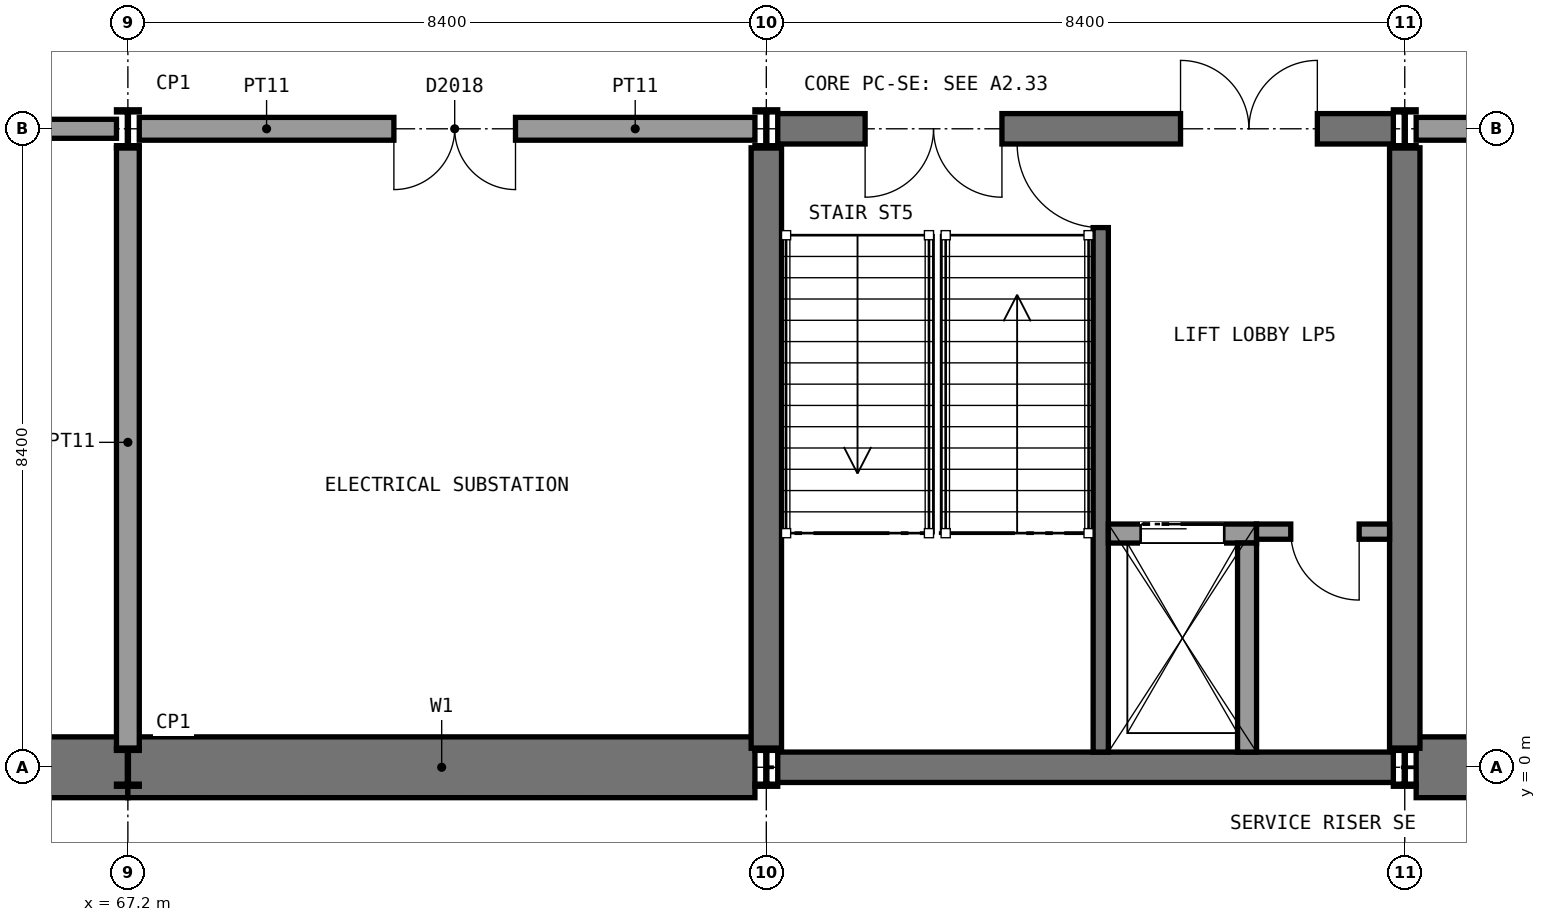
"""IFC4 building model, lengths in metres.
Left out: names, types, materials, properties, quantities, classifications, styles, units other than length and angle.
Written with IfcOpenShell. Run it as: python <this file> out.ifc"""

import sys

from ifc_helpers import new_model, si_unit, direction, frame, frame_2d, origin, origin_2d, place, context, subcontext, project, spatial, rectangle, i_section, extrude, element, fill, save


model = new_model("IFC4")
c1 = context("Model", 3, precision=1e-05, world=origin(), true_north=direction((0.0, 1.0)))
c2 = subcontext(c1, "Body", "Model", "MODEL_VIEW")
j1 = project(units=[si_unit("LENGTHUNIT", "METRE"), si_unit("PLANEANGLEUNIT", "RADIAN")], contexts=[c1])
p1 = place(None, origin())
s1 = spatial("IfcSite", under=j1, at=p1, CompositionType="ELEMENT")
p2 = place(p1, origin())
s2 = spatial("IfcBuilding", under=s1, at=p2, CompositionType="ELEMENT")
p3 = place(p2, frame((0.0, 0.0, -9.9)))
s3 = spatial("IfcBuildingStorey", under=s2, at=p3, CompositionType="ELEMENT", Elevation=-9.9)
p4 = place(p3, frame((58.95, 0.0, 0.0), z_axis=(0.0, 0.0, 1.0), x_axis=(1.0, 0.0, 0.0)))
e1 = element("IfcWall", 1, at=p4, inside=s3, PredefinedType="SOLIDWALL", context=c2, shape_type="SweptSolid", body=[
    extrude(rectangle(XDim=8.25, YDim=0.8, at=frame_2d((4.125, 0.0))), origin(), (0.0, 0.0, 1.0), 4.65),
])
p5 = place(p3, frame((67.2, 0.0, 0.0), z_axis=(0.0, 0.0, 1.0), x_axis=(1.0, 0.0, 0.0)))
e2 = element("IfcWall", 2, at=p5, inside=s3, PredefinedType="SOLIDWALL", context=c2, shape_type="SweptSolid", body=[
    extrude(rectangle(XDim=8.25, YDim=0.8, at=frame_2d((4.125, 0.0))), origin(), (0.0, 0.0, 1.0), 4.65),
])
p6 = place(p3, frame((84.15, 0.0, 0.0), z_axis=(0.0, 0.0, 1.0), x_axis=(1.0, 0.0, 0.0)))
e3 = element("IfcWall", 3, at=p6, inside=s3, PredefinedType="SOLIDWALL", context=c2, shape_type="SweptSolid", body=[
    extrude(rectangle(XDim=8.25, YDim=0.8, at=frame_2d((4.125, 0.0))), origin(), (0.0, 0.0, 1.0), 4.65),
])
p7 = place(p3, frame((75.75, 0.0, 0.0), z_axis=(0.0, 0.0, 1.0), x_axis=(1.0, 0.0, 0.0)))
e4 = element("IfcWall", 4, at=p7, inside=s3, PredefinedType="SHEAR", context=c2, shape_type="SweptSolid", body=[
    extrude(rectangle(XDim=8.1, YDim=0.4, at=frame_2d((4.05, 0.0))), origin(), (0.0, 0.0, 1.0), 4.65),
])
p8 = place(p3, frame((75.75, 8.4, 0.0), z_axis=(0.0, 0.0, 1.0), x_axis=(1.0, 0.0, 0.0)))
e5 = element("IfcWall", 5, at=p8, inside=s3, PredefinedType="SHEAR", context=c2, shape_type="SweptSolid", body=[
    extrude(rectangle(XDim=8.1, YDim=0.4, at=frame_2d((4.05, 0.0))), origin(), (0.0, 0.0, 1.0), 4.65),
])
p9 = place(p8, frame((1.15, 0.0, 0.0)))
e6 = element("IfcOpeningElement", 6, at=p9, cuts=e5, PredefinedType="OPENING", context=c2, shape_type="SweptSolid", body=[
    extrude(rectangle(XDim=1.8, YDim=2.1, at=frame_2d((0.9, 1.05))), frame((0.0, 0.21, 0.0), z_axis=(0.0, -1.0, 0.0), x_axis=(1.0, 0.0, 0.0)), (0.0, 0.0, 1.0), 0.42),
])
p10 = place(p8, frame((5.3, 0.0, 0.0)))
e7 = element("IfcOpeningElement", 7, at=p10, cuts=e5, PredefinedType="OPENING", context=c2, shape_type="SweptSolid", body=[
    extrude(rectangle(XDim=1.8, YDim=2.1, at=frame_2d((0.9, 1.05))), frame((0.0, 0.21, 0.0), z_axis=(0.0, -1.0, 0.0), x_axis=(1.0, 0.0, 0.0)), (0.0, 0.0, 1.0), 0.42),
])
for number, where, z_axis, x_axis in (
    (8, (75.6, 0.25, 0.0), (0.0, 0.0, 1.0), (0.0, 1.0, 0.0)),
    (9, (84.0, 0.25, 0.0), (0.0, 0.0, 1.0), (0.0, 1.0, 0.0)),
):
    element("IfcWall", number, at=place(p3, frame(where, z_axis=z_axis, x_axis=x_axis)), inside=s3, PredefinedType="SHEAR", context=c2, shape_type="SweptSolid", body=[
        extrude(rectangle(XDim=7.9, YDim=0.4, at=frame_2d((3.95, 0.0))), origin(), (0.0, 0.0, 1.0), 4.65),
    ])
for number, where, z_axis, x_axis in (
    (10, (67.2, 0.0, 0.0), (0.0, 0.0, 1.0), (1.0, 0.0, 0.0)),
    (11, (67.2, 8.4, 0.0), (0.0, 0.0, 1.0), (1.0, 0.0, 0.0)),
    (12, (75.6, 0.0, 0.0), (0.0, 0.0, 1.0), (1.0, 0.0, 0.0)),
    (13, (75.6, 8.4, 0.0), (0.0, 0.0, 1.0), (1.0, 0.0, 0.0)),
    (14, (84.0, 0.0, 0.0), (0.0, 0.0, 1.0), (1.0, 0.0, 0.0)),
    (15, (84.0, 8.4, 0.0), (0.0, 0.0, 1.0), (1.0, 0.0, 0.0)),
):
    element("IfcColumn", number, at=place(p3, frame(where, z_axis=z_axis, x_axis=x_axis)), inside=s3, PredefinedType="COLUMN", context=c2, shape_type="SweptSolid", body=[
        extrude(i_section(OverallWidth=0.3, OverallDepth=0.5, WebThickness=0.014, FlangeThickness=0.028, FilletRadius=0.027, at=origin_2d()), origin(), (0.0, 0.0, 1.0), 5.0),
    ])
p11 = place(p3, frame((58.95, 8.4, 0.0), z_axis=(0.0, 0.0, 1.0), x_axis=(1.0, 0.0, 0.0)))
e16 = element("IfcWall", 16, at=p11, inside=s3, PredefinedType="SOLIDWALL", context=c2, shape_type="SweptSolid", body=[
    extrude(rectangle(XDim=8.1, YDim=0.25, at=frame_2d((4.05, 0.0))), origin(), (0.0, 0.0, 1.0), 4.65),
])
p12 = place(p11, frame((3.35, 0.0, 0.0)))
e17 = element("IfcOpeningElement", 17, at=p12, cuts=e16, PredefinedType="OPENING", context=c2, shape_type="SweptSolid", body=[
    extrude(rectangle(XDim=1.6, YDim=2.2, at=frame_2d((0.8, 1.1))), frame((0.0, 0.135, 0.0), z_axis=(0.0, -1.0, 0.0), x_axis=(1.0, 0.0, 0.0)), (0.0, 0.0, 1.0), 0.27),
])
p13 = place(p3, frame((67.35, 8.4, 0.0), z_axis=(0.0, 0.0, 1.0), x_axis=(1.0, 0.0, 0.0)))
e18 = element("IfcWall", 18, at=p13, inside=s3, PredefinedType="SOLIDWALL", context=c2, shape_type="SweptSolid", body=[
    extrude(rectangle(XDim=8.1, YDim=0.3, at=frame_2d((4.05, 0.0))), origin(), (0.0, 0.0, 1.0), 4.65),
])
p14 = place(p13, frame((3.35, 0.0, 0.0)))
e19 = element("IfcOpeningElement", 19, at=p14, cuts=e18, PredefinedType="OPENING", context=c2, shape_type="SweptSolid", body=[
    extrude(rectangle(XDim=1.6, YDim=2.2, at=frame_2d((0.8, 1.1))), frame((0.0, 0.16, 0.0), z_axis=(0.0, -1.0, 0.0), x_axis=(1.0, 0.0, 0.0)), (0.0, 0.0, 1.0), 0.32),
])
p15 = place(p3, frame((84.15, 8.4, 0.0), z_axis=(0.0, 0.0, 1.0), x_axis=(1.0, 0.0, 0.0)))
e20 = element("IfcWall", 20, at=p15, inside=s3, PredefinedType="SOLIDWALL", context=c2, shape_type="SweptSolid", body=[
    extrude(rectangle(XDim=8.1, YDim=0.3, at=frame_2d((4.05, 0.0))), origin(), (0.0, 0.0, 1.0), 4.65),
])
p16 = place(p15, frame((3.35, 0.0, 0.0)))
e21 = element("IfcOpeningElement", 21, at=p16, cuts=e20, PredefinedType="OPENING", context=c2, shape_type="SweptSolid", body=[
    extrude(rectangle(XDim=1.6, YDim=2.2, at=frame_2d((0.8, 1.1))), frame((0.0, 0.16, 0.0), z_axis=(0.0, -1.0, 0.0), x_axis=(1.0, 0.0, 0.0)), (0.0, 0.0, 1.0), 0.32),
])
p17 = place(p3, frame((67.2, 0.25, 0.0), z_axis=(0.0, 0.0, 1.0), x_axis=(0.0, 1.0, 0.0)))
e22 = element("IfcWall", 22, at=p17, inside=s3, PredefinedType="SOLIDWALL", context=c2, shape_type="SweptSolid", body=[
    extrude(rectangle(XDim=7.9, YDim=0.3, at=frame_2d((3.95, 0.0))), origin(), (0.0, 0.0, 1.0), 4.65),
])
p18 = place(p3, frame((80.0, 0.2, 0.0), z_axis=(0.0, 0.0, 1.0), x_axis=(0.0, 1.0, 0.0)))
e23 = element("IfcWall", 23, at=p18, inside=s3, PredefinedType="SHEAR", context=c2, shape_type="SweptSolid", body=[
    extrude(rectangle(XDim=8.0, YDim=0.2, at=frame_2d((4.0, 0.0))), origin(), (0.0, 0.0, 1.0), 4.65),
])
p19 = place(p18, frame((6.9, 0.0, 0.0)))
e24 = element("IfcOpeningElement", 24, at=p19, cuts=e23, PredefinedType="OPENING", context=c2, shape_type="SweptSolid", body=[
    extrude(rectangle(XDim=1.11, YDim=2.1, at=frame_2d((0.555, 1.05))), frame((0.0, 0.11, 0.0), z_axis=(0.0, -1.0, 0.0), x_axis=(1.0, 0.0, 0.0)), (0.0, 0.0, 1.0), 0.22),
])
p20 = place(p3, frame((80.1, 3.075, -1.4), z_axis=(0.0, 0.0, 1.0), x_axis=(1.0, 0.0, 0.0)))
e25 = element("IfcWall", 25, at=p20, inside=s3, PredefinedType="SOLIDWALL", context=c2, shape_type="SweptSolid", body=[
    extrude(rectangle(XDim=1.95, YDim=0.25, at=frame_2d((0.975, 0.0))), origin(), (0.0, 0.0, 1.0), 6.4),
])
p21 = place(p20, frame((0.425, 0.0, 1.4)))
e26 = element("IfcOpeningElement", 26, at=p21, cuts=e25, PredefinedType="OPENING", context=c2, shape_type="SweptSolid", body=[
    extrude(rectangle(XDim=1.1, YDim=2.1, at=frame_2d((0.55, 1.05))), frame((0.0, 0.135, 0.0), z_axis=(0.0, -1.0, 0.0), x_axis=(1.0, 0.0, 0.0)), (0.0, 0.0, 1.0), 0.27),
])
p22 = place(p3, frame((81.925, 0.2, -1.4), z_axis=(0.0, 0.0, 1.0), x_axis=(0.0, 1.0, 0.0)))
e27 = element("IfcWall", 27, at=p22, inside=s3, PredefinedType="SOLIDWALL", context=c2, shape_type="SweptSolid", body=[
    extrude(rectangle(XDim=2.75, YDim=0.25, at=frame_2d((1.375, 0.0))), origin(), (0.0, 0.0, 1.0), 6.4),
])
p23 = place(p3, frame((82.05, 3.1, 0.0), z_axis=(0.0, 0.0, 1.0), x_axis=(1.0, 0.0, 0.0)))
e28 = element("IfcWall", 28, at=p23, inside=s3, PredefinedType="PARTITIONING", context=c2, shape_type="SweptSolid", body=[
    extrude(rectangle(XDim=1.75, YDim=0.2, at=frame_2d((0.875, 0.0))), origin(), (0.0, 0.0, 1.0), 4.65),
])
p24 = place(p23, frame((0.45, 0.0, 0.0)))
e29 = element("IfcOpeningElement", 29, at=p24, cuts=e28, PredefinedType="OPENING", context=c2, shape_type="SweptSolid", body=[
    extrude(rectangle(XDim=0.9, YDim=2.1, at=frame_2d((0.45, 1.05))), frame((0.0, 0.11, 0.0), z_axis=(0.0, -1.0, 0.0), x_axis=(1.0, 0.0, 0.0)), (0.0, 0.0, 1.0), 0.22),
])
p25 = place(p14, frame((1.6, 0.0, 0.0), z_axis=(0.0, 0.0, 1.0), x_axis=(-1.0, 0.0, 0.0)))
e30 = element("IfcDoor", 30, at=p25, inside=s3, OperationType="DOUBLE_DOOR_SINGLE_SWING", PredefinedType="DOOR", context=c2, shape_type="SweptSolid", body=[
    extrude(rectangle(XDim=1.6, YDim=2.2, at=frame_2d((0.8, 1.1))), frame((0.0, 0.025, 0.0), z_axis=(0.0, -1.0, 0.0), x_axis=(1.0, 0.0, 0.0)), (0.0, 0.0, 1.0), 0.05),
])
fill(e19, e30)
p26 = place(p19, origin())
e31 = element("IfcDoor", 31, at=p26, inside=s3, OperationType="SINGLE_SWING_RIGHT", PredefinedType="DOOR", context=c2, shape_type="SweptSolid", body=[
    extrude(rectangle(XDim=1.1, YDim=2.1, at=frame_2d((0.55, 1.05))), frame((0.0, 0.025, 0.0), z_axis=(0.0, -1.0, 0.0), x_axis=(1.0, 0.0, 0.0)), (0.0, 0.0, 1.0), 0.05),
])
fill(e24, e31)
p27 = place(p21, origin())
e32 = element("IfcDoor", 32, at=p27, inside=s3, OperationType="SLIDING_TO_LEFT", PredefinedType="DOOR", context=c2, shape_type="SweptSolid", body=[
    extrude(rectangle(XDim=1.1, YDim=2.1, at=frame_2d((0.55, 1.05))), frame((0.0, 0.025, 0.0), z_axis=(0.0, -1.0, 0.0), x_axis=(1.0, 0.0, 0.0)), (0.0, 0.0, 1.0), 0.05),
])
fill(e26, e32)
p28 = place(p24, frame((0.9, 0.0, 0.0), z_axis=(0.0, 0.0, 1.0), x_axis=(-1.0, 0.0, 0.0)))
e33 = element("IfcDoor", 33, at=p28, inside=s3, OperationType="SINGLE_SWING_LEFT", PredefinedType="DOOR", context=c2, shape_type="SweptSolid", body=[
    extrude(rectangle(XDim=0.9, YDim=2.1, at=frame_2d((0.45, 1.05))), frame((0.0, 0.025, 0.0), z_axis=(0.0, -1.0, 0.0), x_axis=(1.0, 0.0, 0.0)), (0.0, 0.0, 1.0), 0.05),
])
fill(e29, e33)
p29 = place(p9, frame((1.8, 0.0, 0.0), z_axis=(0.0, 0.0, 1.0), x_axis=(-1.0, 0.0, 0.0)))
e34 = element("IfcDoor", 34, at=p29, inside=s3, OperationType="DOUBLE_DOOR_SINGLE_SWING", PredefinedType="DOOR", context=c2, shape_type="SweptSolid", body=[
    extrude(rectangle(XDim=1.8, YDim=2.1, at=frame_2d((0.9, 1.05))), frame((0.0, 0.025, 0.0), z_axis=(0.0, -1.0, 0.0), x_axis=(1.0, 0.0, 0.0)), (0.0, 0.0, 1.0), 0.05),
])
fill(e6, e34)
p30 = place(p10, origin())
e35 = element("IfcDoor", 35, at=p30, inside=s3, OperationType="DOUBLE_DOOR_SINGLE_SWING", PredefinedType="DOOR", context=c2, shape_type="SweptSolid", body=[
    extrude(rectangle(XDim=1.8, YDim=2.1, at=frame_2d((0.9, 1.05))), frame((0.0, 0.025, 0.0), z_axis=(0.0, -1.0, 0.0), x_axis=(1.0, 0.0, 0.0)), (0.0, 0.0, 1.0), 0.05),
])
fill(e7, e35)
save(model, sys.argv[1])
